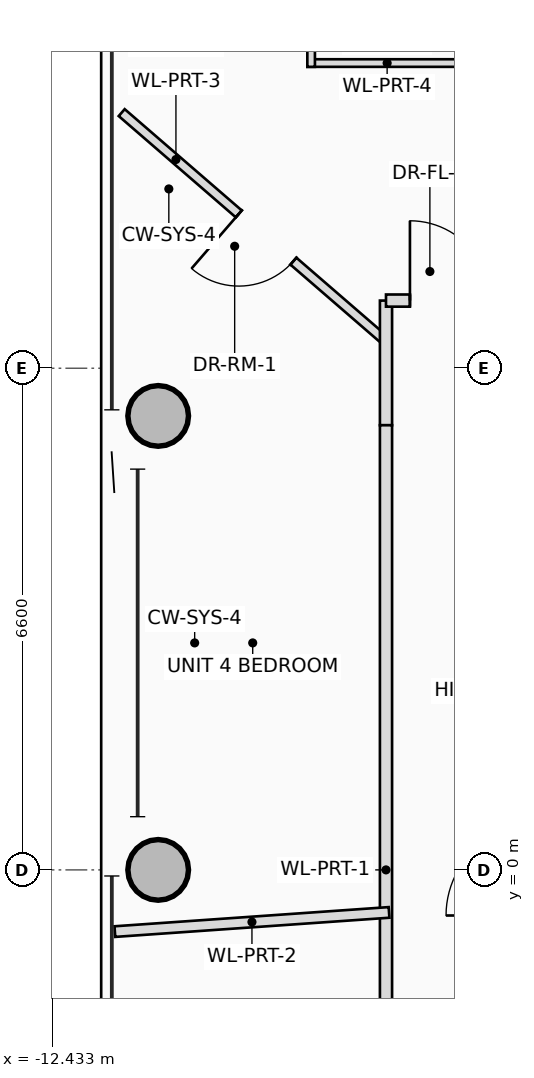
"""IFC4 building model, lengths in metres.
Left out: names, types, materials, properties, quantities, classifications, styles, units other than length and angle.
Written with IfcOpenShell. Run it as: python <this file> out.ifc"""

import sys

from ifc_helpers import new_model, si_unit, direction, frame, frame_2d, origin, origin_2d, place, context, subcontext, project, spatial, rectangle, hollow_circle, extrude, source, transform, mapped, element, fill, save


model = new_model("IFC4")
c1 = context("Model", 3, precision=1e-05, world=origin(), true_north=direction((0.0, 1.0)))
c2 = subcontext(c1, "Body", "Model", "MODEL_VIEW")
j1 = project(units=[si_unit("LENGTHUNIT", "METRE"), si_unit("PLANEANGLEUNIT", "RADIAN")], contexts=[c1])
p1 = place(None, origin())
s1 = spatial("IfcSite", under=j1, at=p1, CompositionType="ELEMENT")
p2 = place(p1, origin())
s2 = spatial("IfcBuilding", under=s1, at=p2, CompositionType="ELEMENT")
p3 = place(p2, frame((0.0, 0.0, 300.2)))
s3 = spatial("IfcBuildingStorey", under=s2, at=p3, CompositionType="ELEMENT", Elevation=300.2)
m1 = source(origin(), c2, "Body", "SweptSolid", [
    extrude(hollow_circle(Radius=0.4, WallThickness=0.028, at=origin_2d()), origin(), (0.0, 0.0, 1.0), 3.45),
])
for number, where, z_axis, x_axis in (
    (1, (-11.037, 5.973, 0.0), (0.0, 0.0, 1.0), (1.0, 0.0, 0.0)),
    (2, (-11.037, 0.0, 0.0), (0.0, 0.0, 1.0), (1.0, 0.0, 0.0)),
):
    element("IfcColumn", number, at=place(p3, frame(where, z_axis=z_axis, x_axis=x_axis)), inside=s3, PredefinedType="COLUMN", context=c2, shape_type="MappedRepresentation", body=[
        mapped(m1, transform((0.0, 0.0, 0.0), scale=1.0)),
    ])
p4 = place(p3, frame((-8.07, 6.981, 0.0), z_axis=(0.0, 0.0, 1.0), x_axis=(-0.756280799409, 0.654247164644, 0.0)))
e3 = element("IfcWall", 3, at=p4, inside=s3, PredefinedType="PARTITIONING", context=c2, shape_type="SweptSolid", body=[
    extrude(rectangle(XDim=4.558, YDim=0.12, at=frame_2d((2.279, 0.0))), origin(), (0.0, 0.0, 1.0), 2.815),
])
p5 = place(p4, frame((1.571, 0.0, 0.0)))
e4 = element("IfcOpeningElement", 4, at=p5, cuts=e3, PredefinedType="OPENING", context=c2, shape_type="SweptSolid", body=[
    extrude(rectangle(XDim=0.95, YDim=2.1, at=frame_2d((0.475, 1.05))), frame((0.0, 0.07, 0.0), z_axis=(0.0, -1.0, 0.0), x_axis=(1.0, 0.0, 0.0)), (0.0, 0.0, 1.0), 0.14),
])
p6 = place(p3, frame((-6.975, 10.615, 0.0), z_axis=(0.0, 0.0, 1.0), x_axis=(-1.0, 0.0, 0.0)))
e5 = element("IfcWall", 5, at=p6, inside=s3, PredefinedType="PARTITIONING", context=c2, shape_type="SweptSolid", body=[
    extrude(rectangle(XDim=2.1, YDim=0.1, at=frame_2d((1.05, 0.0))), origin(), (0.0, 0.0, 1.0), 2.905),
])
p7 = place(p3, frame((-9.025, 10.565, 0.0), z_axis=(0.0, 0.0, 1.0), x_axis=(0.0, 1.0, 0.0)))
e6 = element("IfcWall", 6, at=p7, inside=s3, PredefinedType="PARTITIONING", context=c2, shape_type="SweptSolid", body=[
    extrude(rectangle(XDim=2.05, YDim=0.1, at=frame_2d((1.025, 0.0))), origin(), (0.0, 0.0, 1.0), 3.25),
])
p8 = place(p3, frame((-8.04, 5.85, 0.0), z_axis=(0.0, 0.0, 1.0), x_axis=(0.0, 1.0, 0.0)))
e7 = element("IfcWall", 7, at=p8, inside=s3, PredefinedType="PARTITIONING", context=c2, shape_type="SweptSolid", body=[
    extrude(rectangle(XDim=1.64, YDim=0.16, at=frame_2d((0.82, 0.0))), origin(), (0.0, 0.0, 1.0), 2.905),
])
p9 = place(p3, frame((-8.04, 7.49, 0.0), z_axis=(0.0, 0.0, 1.0), x_axis=(1.0, 0.0, 0.0)))
e8 = element("IfcWall", 8, at=p9, inside=s3, PredefinedType="PARTITIONING", context=c2, shape_type="SweptSolid", body=[
    extrude(rectangle(XDim=1.68, YDim=0.16, at=frame_2d((0.84, 0.0))), origin(), (0.0, 0.0, 1.0), 2.655),
])
p10 = place(p9, frame((0.315, 0.0, 0.0)))
e9 = element("IfcOpeningElement", 9, at=p10, cuts=e8, PredefinedType="OPENING", context=c2, shape_type="SweptSolid", body=[
    extrude(rectangle(XDim=1.05, YDim=2.2, at=frame_2d((0.525, 1.1))), frame((0.0, 0.09, 0.0), z_axis=(0.0, -1.0, 0.0), x_axis=(1.0, 0.0, 0.0)), (0.0, 0.0, 1.0), 0.18),
])
p11 = place(p3, frame((-8.04, -5.85, 0.0), z_axis=(0.0, 0.0, 1.0), x_axis=(0.0, 1.0, 0.0)))
e10 = element("IfcWall", 10, at=p11, inside=s3, PredefinedType="PARTITIONING", context=c2, shape_type="SweptSolid", body=[
    extrude(rectangle(XDim=11.7, YDim=0.16, at=frame_2d((5.85, 0.0))), origin(), (0.0, 0.0, 1.0), 2.655),
])
p12 = place(p3, frame((-8.0, -0.559, 0.0), z_axis=(0.0, 0.0, 1.0), x_axis=(-0.99756047181, -0.069807629118, 0.0)))
e11 = element("IfcWall", 11, at=p12, inside=s3, PredefinedType="PARTITIONING", context=c2, shape_type="SweptSolid", body=[
    extrude(rectangle(XDim=3.616, YDim=0.14, at=frame_2d((1.808, 0.0))), origin(), (0.0, 0.0, 1.0), 2.655),
])
p13 = place(p5, origin())
e12 = element("IfcDoor", 12, at=p13, inside=s3, OperationType="SINGLE_SWING_RIGHT", PredefinedType="DOOR", context=c2, shape_type="SweptSolid", body=[
    extrude(rectangle(XDim=0.95, YDim=2.1, at=frame_2d((0.475, 1.05))), frame((0.0, 0.025, 0.0), z_axis=(0.0, -1.0, 0.0), x_axis=(1.0, 0.0, 0.0)), (0.0, 0.0, 1.0), 0.05),
])
fill(e4, e12)
p14 = place(p10, origin())
e13 = element("IfcDoor", 13, at=p14, inside=s3, OperationType="SINGLE_SWING_LEFT", PredefinedType="DOOR", context=c2, shape_type="SweptSolid", body=[
    extrude(rectangle(XDim=1.05, YDim=2.2, at=frame_2d((0.525, 1.1))), frame((0.0, 0.025, 0.0), z_axis=(0.0, -1.0, 0.0), x_axis=(1.0, 0.0, 0.0)), (0.0, 0.0, 1.0), 0.05),
])
fill(e9, e13)
save(model, sys.argv[1])
